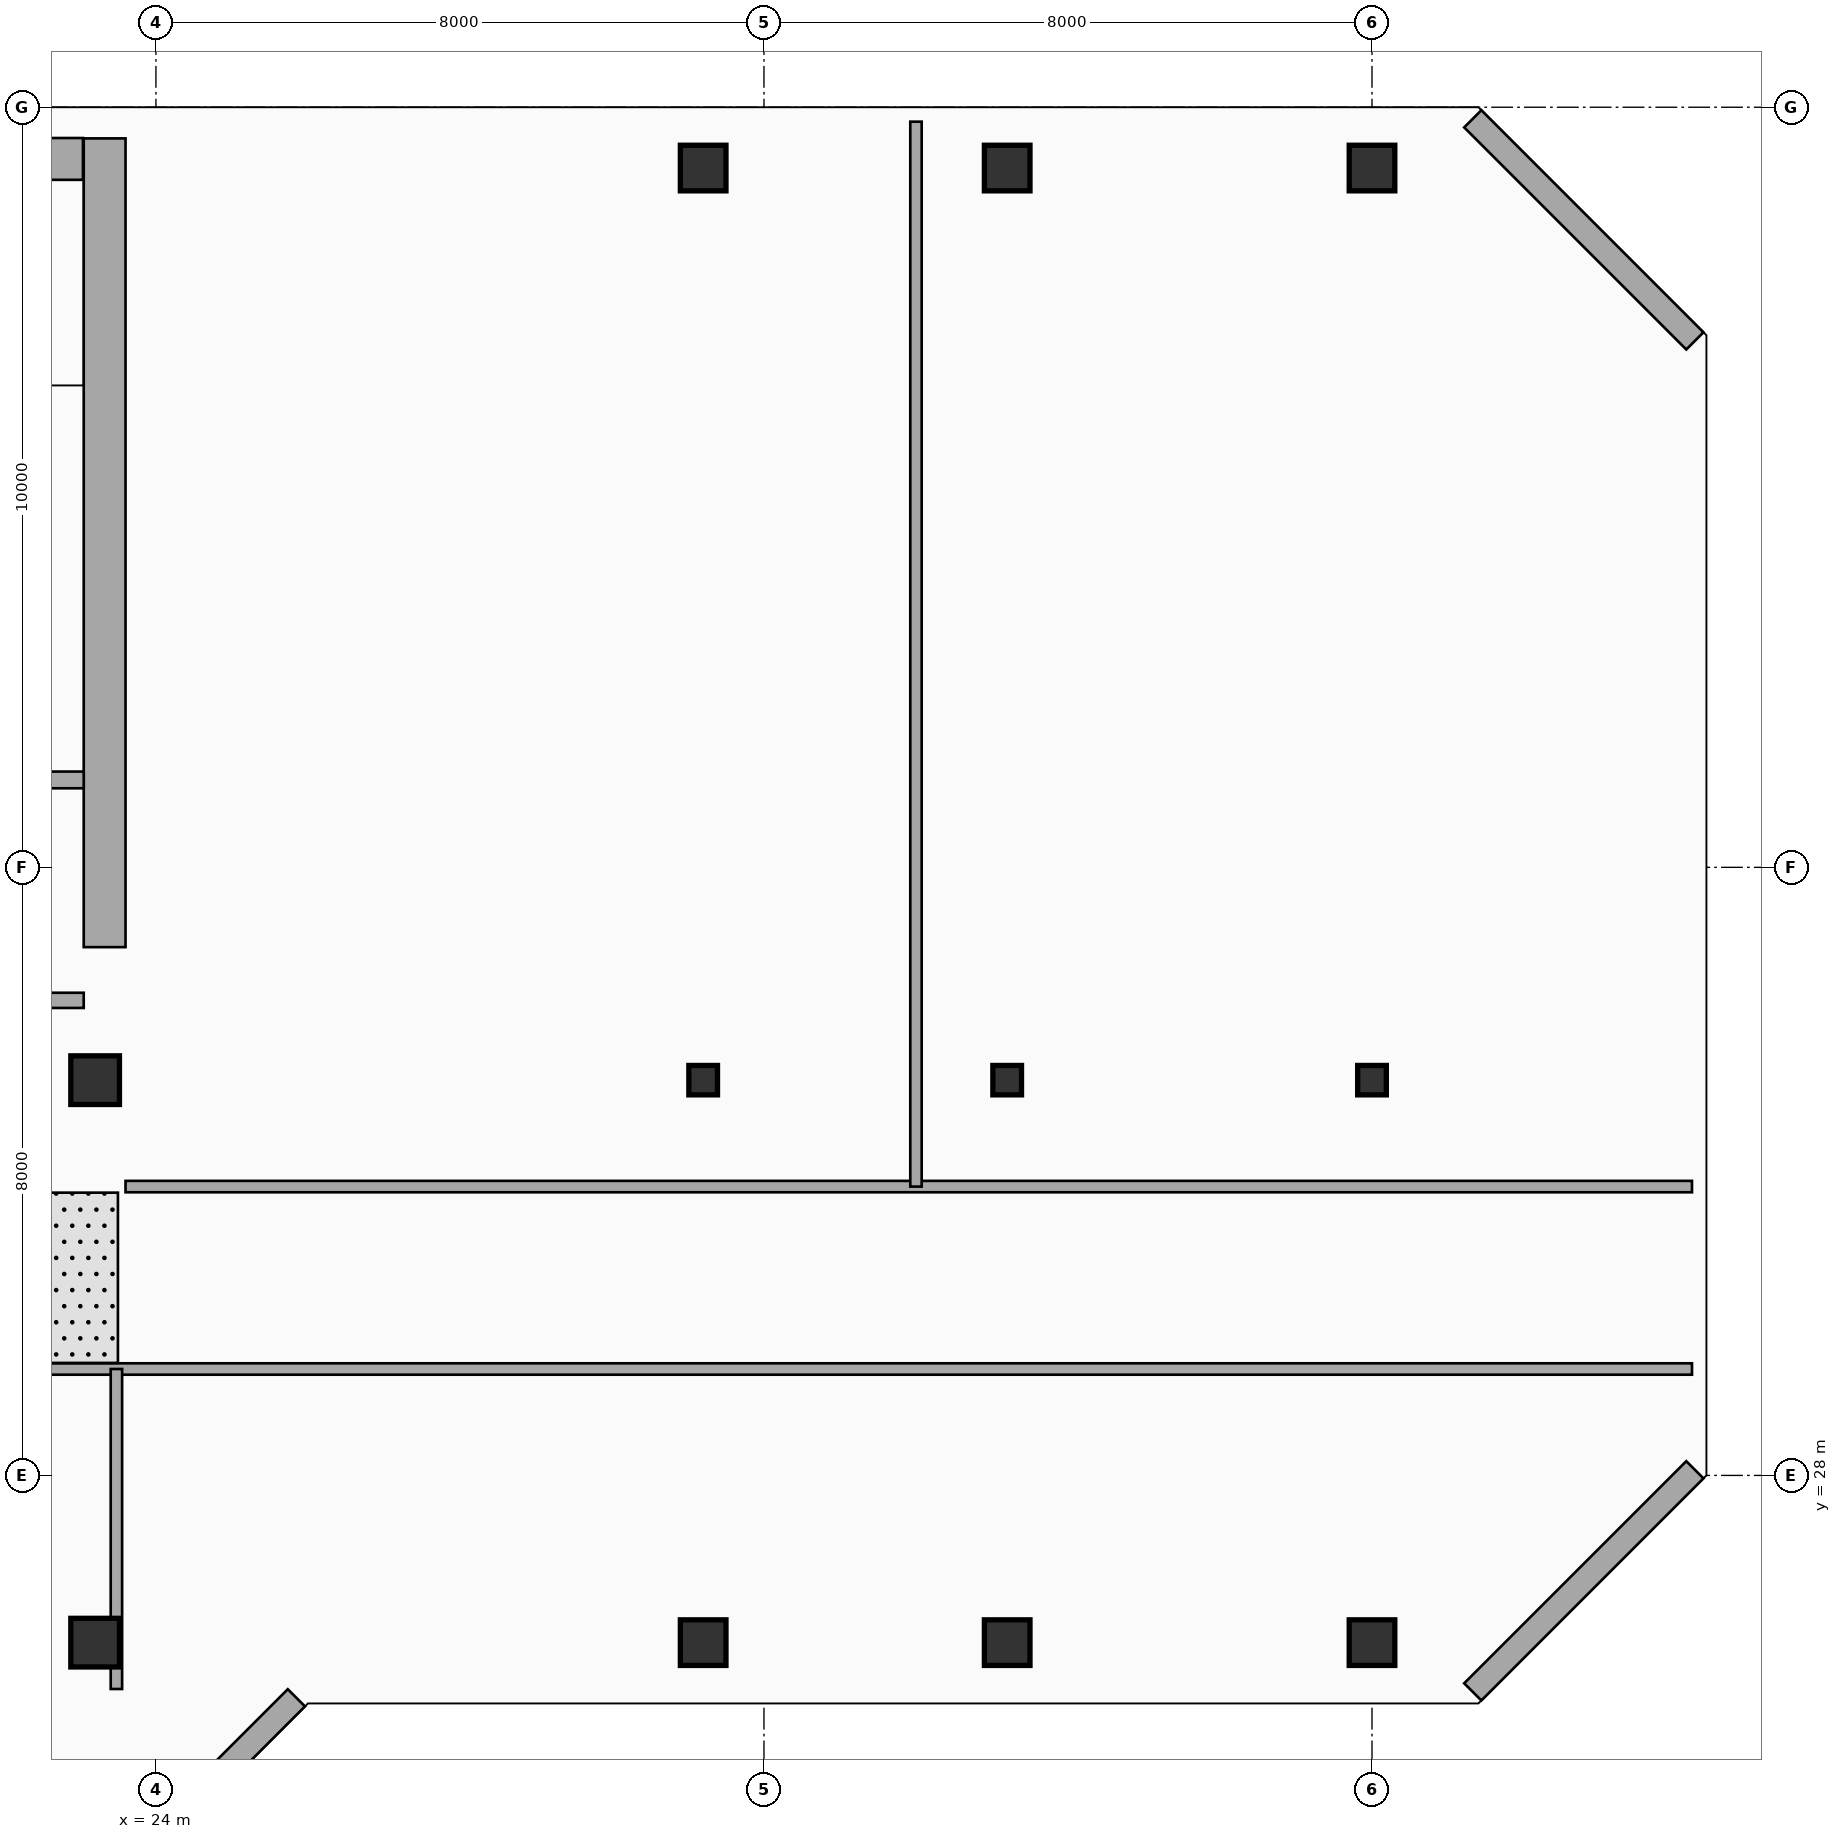
"""IFC4 building model, lengths in metres.
Left out: names, types, materials, properties, quantities, classifications, styles, units other than length and angle.
Written with IfcOpenShell. Run it as: python <this file> out.ifc"""

import sys

from ifc_helpers import new_model, si_unit, direction, frame, frame_2d, origin, origin_2d, place, context, subcontext, project, spatial, rectangle, i_section, extrude, element, fill, save


model = new_model("IFC4")
c1 = context("Model", 3, precision=1e-05, world=origin(), true_north=direction((0.0, 1.0)))
c2 = subcontext(c1, "Body", "Model", "MODEL_VIEW")
j1 = project(units=[si_unit("LENGTHUNIT", "METRE"), si_unit("PLANEANGLEUNIT", "RADIAN")], contexts=[c1])
p1 = place(None, origin())
s1 = spatial("IfcSite", under=j1, at=p1, CompositionType="ELEMENT")
p2 = place(p1, origin())
s2 = spatial("IfcBuilding", under=s1, at=p2, CompositionType="ELEMENT")
p3 = place(p2, frame((0.0, 0.0, 347.49)))
s3 = spatial("IfcBuildingStorey", under=s2, at=p3, CompositionType="ELEMENT", Elevation=347.49)
p4 = place(p3, frame((23.325, 34.95, 0.0), z_axis=(0.0, 0.0, 1.0), x_axis=(0.0, 1.0, 0.0)))
e1 = element("IfcWall", 1, at=p4, inside=s3, PredefinedType="SHEAR", context=c2, shape_type="SweptSolid", body=[
    extrude(rectangle(XDim=10.64, YDim=0.55, at=frame_2d((5.32, 0.0))), origin(), (0.0, 0.0, 1.0), 4.62),
])
p5 = place(p3, frame((19.35, 45.32, 0.0), z_axis=(0.0, 0.0, 1.0), x_axis=(1.0, 0.0, 0.0)))
e2 = element("IfcWall", 2, at=p5, inside=s3, PredefinedType="SHEAR", context=c2, shape_type="SweptSolid", body=[
    extrude(rectangle(XDim=3.69, YDim=0.55, at=frame_2d((1.845, 0.0))), origin(), (0.0, 0.0, 1.0), 4.62),
])
p6 = place(p5, frame((1.15, 0.0, 1.05)))
e3 = element("IfcOpeningElement", 3, at=p6, cuts=e2, PredefinedType="OPENING", context=c2, shape_type="SweptSolid", body=[
    extrude(rectangle(XDim=1.4, YDim=1.8, at=frame_2d((0.7, 0.9))), frame((0.0, 0.285, 0.0), z_axis=(0.0, -1.0, 0.0), x_axis=(1.0, 0.0, 0.0)), (0.0, 0.0, 1.0), 0.57),
])
for number, where, z_axis, x_axis in (
    (4, (23.2, 25.8, 0.0), (0.0, 0.0, 1.0), (1.0, 0.0, 0.0)),
    (5, (23.2, 33.2, 0.0), (0.0, 0.0, 1.0), (1.0, 0.0, 0.0)),
):
    element("IfcColumn", number, at=place(p3, frame(where, z_axis=z_axis, x_axis=x_axis)), inside=s3, PredefinedType="COLUMN", context=c2, shape_type="SweptSolid", body=[
        extrude(rectangle(XDim=0.64, YDim=0.64, at=origin_2d()), origin(), (0.0, 0.0, 1.0), 4.62),
    ])
p7 = place(p3, frame((31.2, 25.8, 0.0), z_axis=(0.0, 0.0, 1.0), x_axis=(1.0, 0.0, 0.0)))
e6 = element("IfcColumn", 6, at=p7, inside=s3, PredefinedType="COLUMN", context=c2, shape_type="SweptSolid", body=[
    extrude(rectangle(XDim=0.6, YDim=0.6, at=origin_2d()), origin(), (0.0, 0.0, 1.0), 4.62),
])
p8 = place(p3, frame((31.2, 33.2, 0.0), z_axis=(0.0, 0.0, 1.0), x_axis=(1.0, 0.0, 0.0)))
e7 = element("IfcColumn", 7, at=p8, inside=s3, PredefinedType="COLUMN", context=c2, shape_type="SweptSolid", body=[
    extrude(i_section(OverallWidth=0.377, OverallDepth=0.387, WebThickness=0.016, FlangeThickness=0.027, at=origin_2d()), origin(), (0.0, 0.0, 1.0), 4.62),
])
for number, where, z_axis, x_axis in (
    (8, (31.2, 45.2, 0.0), (0.0, 0.0, 1.0), (1.0, 0.0, 0.0)),
    (9, (35.2, 25.8, 0.0), (0.0, 0.0, 1.0), (1.0, 0.0, 0.0)),
):
    element("IfcColumn", number, at=place(p3, frame(where, z_axis=z_axis, x_axis=x_axis)), inside=s3, PredefinedType="COLUMN", context=c2, shape_type="SweptSolid", body=[
        extrude(rectangle(XDim=0.6, YDim=0.6, at=origin_2d()), origin(), (0.0, 0.0, 1.0), 4.62),
    ])
p9 = place(p3, frame((35.2, 33.2, 0.0), z_axis=(0.0, 0.0, 1.0), x_axis=(1.0, 0.0, 0.0)))
e10 = element("IfcColumn", 10, at=p9, inside=s3, PredefinedType="COLUMN", context=c2, shape_type="SweptSolid", body=[
    extrude(i_section(OverallWidth=0.377, OverallDepth=0.387, WebThickness=0.016, FlangeThickness=0.027, at=origin_2d()), origin(), (0.0, 0.0, 1.0), 4.62),
])
for number, where, z_axis, x_axis in (
    (11, (35.2, 45.2, 0.0), (0.0, 0.0, 1.0), (1.0, 0.0, 0.0)),
    (12, (40.0, 25.8, 0.0), (0.0, 0.0, 1.0), (1.0, 0.0, 0.0)),
):
    element("IfcColumn", number, at=place(p3, frame(where, z_axis=z_axis, x_axis=x_axis)), inside=s3, PredefinedType="COLUMN", context=c2, shape_type="SweptSolid", body=[
        extrude(rectangle(XDim=0.6, YDim=0.6, at=origin_2d()), origin(), (0.0, 0.0, 1.0), 4.62),
    ])
p10 = place(p3, frame((40.0, 33.2, 0.0), z_axis=(0.0, 0.0, 1.0), x_axis=(1.0, 0.0, 0.0)))
e13 = element("IfcColumn", 13, at=p10, inside=s3, PredefinedType="COLUMN", context=c2, shape_type="SweptSolid", body=[
    extrude(i_section(OverallWidth=0.377, OverallDepth=0.387, WebThickness=0.016, FlangeThickness=0.027, at=origin_2d()), origin(), (0.0, 0.0, 1.0), 4.62),
])
p11 = place(p3, frame((40.0, 45.2, 0.0), z_axis=(0.0, 0.0, 1.0), x_axis=(1.0, 0.0, 0.0)))
e14 = element("IfcColumn", 14, at=p11, inside=s3, PredefinedType="COLUMN", context=c2, shape_type="SweptSolid", body=[
    extrude(rectangle(XDim=0.6, YDim=0.6, at=origin_2d()), origin(), (0.0, 0.0, 1.0), 4.62),
])
p12 = place(p3, frame((23.926, 23.152, 0.0), z_axis=(0.0, 0.0, 1.0), x_axis=(0.707106781187, 0.707106781187, 0.0)))
e15 = element("IfcWall", 15, at=p12, inside=s3, PredefinedType="SOLIDWALL", context=c2, shape_type="SweptSolid", body=[
    extrude(rectangle(XDim=2.718, YDim=0.32, at=frame_2d((1.359, 0.0))), origin(), (0.0, 0.0, 1.0), 4.37),
])
for number, where, z_axis, x_axis in (
    (16, (41.326, 25.152, 0.0), (0.0, 0.0, 1.0), (0.707, 0.707, 0.0)),
    (17, (44.248, 42.926, 0.0), (0.0, 0.0, 1.0), (-0.707, 0.707, 0.0)),
):
    element("IfcWall", number, at=place(p3, frame(where, z_axis=z_axis, x_axis=x_axis)), inside=s3, PredefinedType="SOLIDWALL", context=c2, shape_type="SweptSolid", body=[
        extrude(rectangle(XDim=4.133, YDim=0.32, at=frame_2d((2.066, 0.0))), origin(), (0.0, 0.0, 1.0), 4.37),
    ])
p13 = place(p3, frame((19.9, 37.15, 0.0), z_axis=(0.0, 0.0, 1.0), x_axis=(1.0, 0.0, 0.0)))
e18 = element("IfcWall", 18, at=p13, inside=s3, PredefinedType="PARTITIONING", context=c2, shape_type="SweptSolid", body=[
    extrude(rectangle(XDim=3.15, YDim=0.22, at=frame_2d((1.575, 0.0))), origin(), (0.0, 0.0, 1.0), 4.37),
])
p14 = place(p13, frame((2.05, 0.0, 0.0), z_axis=(0.0, 0.0, 1.0), x_axis=(-1.0, 0.0, 0.0)))
e19 = element("IfcOpeningElement", 19, at=p14, cuts=e18, PredefinedType="OPENING", context=c2, shape_type="SweptSolid", body=[
    extrude(rectangle(XDim=1.05, YDim=2.15, at=frame_2d((0.525, 1.075))), frame((0.0, 0.12, 0.0), z_axis=(0.0, -1.0, 0.0), x_axis=(1.0, 0.0, 0.0)), (0.0, 0.0, 1.0), 0.24),
])
p15 = place(p3, frame((19.8, 34.25, 0.0), z_axis=(0.0, 0.0, 1.0), x_axis=(1.0, 0.0, 0.0)))
e20 = element("IfcWall", 20, at=p15, inside=s3, PredefinedType="PARTITIONING", context=c2, shape_type="SweptSolid", body=[
    extrude(rectangle(XDim=3.25, YDim=0.2, at=frame_2d((1.625, 0.0))), origin(), (0.0, 0.0, 1.0), 4.37),
])
p16 = place(p15, frame((2.15, 0.0, 0.0), z_axis=(0.0, 0.0, 1.0), x_axis=(-1.0, 0.0, 0.0)))
e21 = element("IfcOpeningElement", 21, at=p16, cuts=e20, PredefinedType="OPENING", context=c2, shape_type="SweptSolid", body=[
    extrude(rectangle(XDim=1.1, YDim=2.15, at=frame_2d((0.55, 1.075))), frame((0.0, 0.11, 0.0), z_axis=(0.0, -1.0, 0.0), x_axis=(1.0, 0.0, 0.0)), (0.0, 0.0, 1.0), 0.22),
])
p17 = place(p3, frame((0.19, 29.4, 0.0), z_axis=(0.0, 0.0, 1.0), x_axis=(1.0, 0.0, 0.0)))
e22 = element("IfcWall", 22, at=p17, inside=s3, PredefinedType="PARTITIONING", context=c2, shape_type="SweptSolid", body=[
    extrude(rectangle(XDim=44.02, YDim=0.15, at=frame_2d((22.01, 0.0))), origin(), (0.0, 0.0, 1.0), 4.055),
])
p18 = place(p17, frame((4.0, 0.0, 0.0)))
e23 = element("IfcOpeningElement", 23, at=p18, cuts=e22, PredefinedType="OPENING", context=c2, shape_type="SweptSolid", body=[
    extrude(rectangle(XDim=1.8, YDim=2.3, at=frame_2d((0.9, 1.15))), frame((0.0, 0.085, 0.0), z_axis=(0.0, -1.0, 0.0), x_axis=(1.0, 0.0, 0.0)), (0.0, 0.0, 1.0), 0.17),
])
p19 = place(p17, frame((15.0, 0.0, 0.0)))
e24 = element("IfcOpeningElement", 24, at=p19, cuts=e22, PredefinedType="OPENING", context=c2, shape_type="SweptSolid", body=[
    extrude(rectangle(XDim=1.8, YDim=2.3, at=frame_2d((0.9, 1.15))), frame((0.0, 0.085, 0.0), z_axis=(0.0, -1.0, 0.0), x_axis=(1.0, 0.0, 0.0)), (0.0, 0.0, 1.0), 0.17),
])
p20 = place(p17, frame((27.0, 0.0, 0.0)))
e25 = element("IfcOpeningElement", 25, at=p20, cuts=e22, PredefinedType="OPENING", context=c2, shape_type="SweptSolid", body=[
    extrude(rectangle(XDim=1.05, YDim=2.15, at=frame_2d((0.525, 1.075))), frame((0.0, 0.085, 0.0), z_axis=(0.0, -1.0, 0.0), x_axis=(1.0, 0.0, 0.0)), (0.0, 0.0, 1.0), 0.17),
])
p21 = place(p3, frame((23.6, 31.8, 0.0), z_axis=(0.0, 0.0, 1.0), x_axis=(1.0, 0.0, 0.0)))
e26 = element("IfcWall", 26, at=p21, inside=s3, PredefinedType="PARTITIONING", context=c2, shape_type="SweptSolid", body=[
    extrude(rectangle(XDim=20.61, YDim=0.15, at=frame_2d((10.305, 0.0))), origin(), (0.0, 0.0, 1.0), 4.37),
])
p22 = place(p21, frame((3.0, 0.0, 0.0)))
e27 = element("IfcOpeningElement", 27, at=p22, cuts=e26, PredefinedType="OPENING", context=c2, shape_type="SweptSolid", body=[
    extrude(rectangle(XDim=1.05, YDim=2.15, at=frame_2d((0.525, 1.075))), frame((0.0, 0.085, 0.0), z_axis=(0.0, -1.0, 0.0), x_axis=(1.0, 0.0, 0.0)), (0.0, 0.0, 1.0), 0.17),
])
p23 = place(p21, frame((12.0, 0.0, 0.0)))
e28 = element("IfcOpeningElement", 28, at=p23, cuts=e26, PredefinedType="OPENING", context=c2, shape_type="SweptSolid", body=[
    extrude(rectangle(XDim=0.95, YDim=2.15, at=frame_2d((0.475, 1.075))), frame((0.0, 0.085, 0.0), z_axis=(0.0, -1.0, 0.0), x_axis=(1.0, 0.0, 0.0)), (0.0, 0.0, 1.0), 0.17),
])
p24 = place(p3, frame((23.48, 25.19, 0.0), z_axis=(0.0, 0.0, 1.0), x_axis=(0.0, 1.0, 0.0)))
e29 = element("IfcWall", 29, at=p24, inside=s3, PredefinedType="PARTITIONING", context=c2, shape_type="SweptSolid", body=[
    extrude(rectangle(XDim=4.21, YDim=0.15, at=frame_2d((2.105, 0.0))), origin(), (0.0, 0.0, 1.0), 3.855),
])
p25 = place(p3, frame((34.0, 31.8, 0.0), z_axis=(0.0, 0.0, 1.0), x_axis=(0.0, 1.0, 0.0)))
e30 = element("IfcWall", 30, at=p25, inside=s3, PredefinedType="PARTITIONING", context=c2, shape_type="SweptSolid", body=[
    extrude(rectangle(XDim=14.01, YDim=0.15, at=frame_2d((7.005, 0.0))), origin(), (0.0, 0.0, 1.0), 4.37),
])
p26 = place(p20, origin())
e31 = element("IfcDoor", 31, at=p26, inside=s3, OperationType="SINGLE_SWING_LEFT", PredefinedType="DOOR", context=c2, shape_type="SweptSolid", body=[
    extrude(rectangle(XDim=1.05, YDim=2.15, at=frame_2d((0.525, 1.075))), frame((0.0, 0.025, 0.0), z_axis=(0.0, -1.0, 0.0), x_axis=(1.0, 0.0, 0.0)), (0.0, 0.0, 1.0), 0.05),
])
fill(e25, e31)
p27 = place(p22, origin())
e32 = element("IfcDoor", 32, at=p27, inside=s3, OperationType="SINGLE_SWING_RIGHT", PredefinedType="DOOR", context=c2, shape_type="SweptSolid", body=[
    extrude(rectangle(XDim=1.05, YDim=2.15, at=frame_2d((0.525, 1.075))), frame((0.0, 0.025, 0.0), z_axis=(0.0, -1.0, 0.0), x_axis=(1.0, 0.0, 0.0)), (0.0, 0.0, 1.0), 0.05),
])
fill(e27, e32)
p28 = place(p23, origin())
e33 = element("IfcDoor", 33, at=p28, inside=s3, OperationType="SINGLE_SWING_LEFT", PredefinedType="DOOR", context=c2, shape_type="SweptSolid", body=[
    extrude(rectangle(XDim=0.95, YDim=2.15, at=frame_2d((0.475, 1.075))), frame((0.0, 0.025, 0.0), z_axis=(0.0, -1.0, 0.0), x_axis=(1.0, 0.0, 0.0)), (0.0, 0.0, 1.0), 0.05),
])
fill(e28, e33)
save(model, sys.argv[1])
